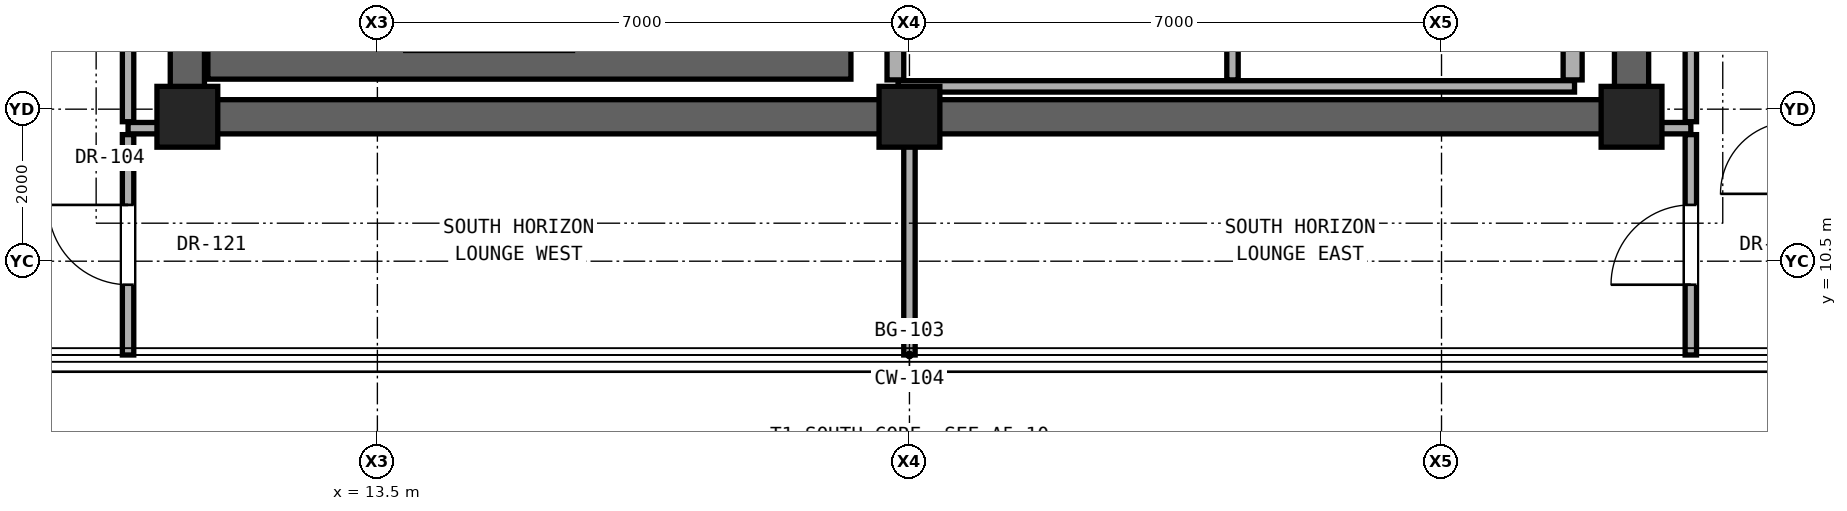
"""IFC4 building model, lengths in metres.
Left out: names, types, materials, properties, quantities, classifications, styles, units other than length and angle.
Written with IfcOpenShell. Run it as: python <this file> out.ifc"""

import sys

from ifc_helpers import new_model, si_unit, direction, frame, frame_2d, origin, origin_2d, place, context, subcontext, project, spatial, rectangle, extrude, element, fill, save


model = new_model("IFC4")
c1 = context("Model", 3, precision=1e-05, world=origin(), true_north=direction((0.0, 1.0)))
c2 = subcontext(c1, "Body", "Model", "MODEL_VIEW")
j1 = project(units=[si_unit("LENGTHUNIT", "METRE"), si_unit("PLANEANGLEUNIT", "RADIAN")], contexts=[c1])
p1 = place(None, origin())
s1 = spatial("IfcSite", under=j1, at=p1, CompositionType="ELEMENT")
p2 = place(p1, origin())
s2 = spatial("IfcBuilding", under=s1, at=p2, CompositionType="ELEMENT")
p3 = place(p2, frame((0.0, 0.0, 229.3)))
s3 = spatial("IfcBuildingStorey", under=s2, at=p3, CompositionType="ELEMENT", Elevation=229.3)
for number, where, z_axis, x_axis in (
    (1, (11.0, 12.4, 0.0), (0.0, 0.0, 1.0), (1.0, 0.0, 0.0)),
    (2, (20.5, 12.4, 0.0), (0.0, 0.0, 1.0), (1.0, 0.0, 0.0)),
    (3, (30.0, 12.4, 0.0), (0.0, 0.0, 1.0), (1.0, 0.0, 0.0)),
):
    element("IfcColumn", number, at=place(p3, frame(where, z_axis=z_axis, x_axis=x_axis)), inside=s3, PredefinedType="COLUMN", context=c2, shape_type="SweptSolid", body=[
        extrude(rectangle(XDim=0.8, YDim=0.8, at=origin_2d()), origin(), (0.0, 0.0, 1.0), 3.3),
    ])
p4 = place(p3, frame((11.0, 12.4, 0.0), z_axis=(0.0, 0.0, 1.0), x_axis=(1.0, 0.0, 0.0)))
e4 = element("IfcWall", 4, at=p4, inside=s3, PredefinedType="SHEAR", context=c2, shape_type="SweptSolid", body=[
    extrude(rectangle(XDim=19.0, YDim=0.45, at=frame_2d((9.5, 0.0))), origin(), (0.0, 0.0, 1.0), 3.1),
])
for number, where, z_axis, x_axis in (
    (5, (11.0, 12.4, 0.0), (0.0, 0.0, 1.0), (0.0, 1.0, 0.0)),
    (6, (30.0, 12.4, 0.0), (0.0, 0.0, 1.0), (0.0, 1.0, 0.0)),
):
    element("IfcWall", number, at=place(p3, frame(where, z_axis=z_axis, x_axis=x_axis)), inside=s3, PredefinedType="SHEAR", context=c2, shape_type="SweptSolid", body=[
        extrude(rectangle(XDim=6.0, YDim=0.45, at=frame_2d((3.0, 0.0))), origin(), (0.0, 0.0, 1.0), 3.1),
    ])
for number, where, z_axis, x_axis in (
    (7, (10.22, 12.25, 0.0), (0.0, 0.0, 1.0), (1.0, 0.0, 0.0)),
    (8, (30.22, 12.25, 0.0), (0.0, 0.0, 1.0), (1.0, 0.0, 0.0)),
):
    element("IfcWall", number, at=place(p3, frame(where, z_axis=z_axis, x_axis=x_axis)), inside=s3, PredefinedType="PARTITIONING", context=c2, shape_type="SweptSolid", body=[
        extrude(rectangle(XDim=0.56, YDim=0.15, at=frame_2d((0.28, 0.0))), origin(), (0.0, 0.0, 1.0), 3.1),
    ])
p5 = place(p3, frame((20.35, 12.8, 0.0), z_axis=(0.0, 0.0, 1.0), x_axis=(1.0, 0.0, 0.0)))
e9 = element("IfcWall", 9, at=p5, inside=s3, PredefinedType="PARTITIONING", context=c2, shape_type="SweptSolid", body=[
    extrude(rectangle(XDim=8.9, YDim=0.15, at=frame_2d((4.45, 0.0))), origin(), (0.0, 0.0, 1.0), 3.1),
])
p6 = place(p3, frame((11.27, 13.12, 0.0), z_axis=(0.0, 0.0, 1.0), x_axis=(1.0, 0.0, 0.0)))
e10 = element("IfcWall", 10, at=p6, inside=s3, PredefinedType="SHEAR", context=c2, shape_type="SweptSolid", body=[
    extrude(rectangle(XDim=8.46, YDim=0.45, at=frame_2d((4.23, 0.0))), origin(), (0.0, 0.0, 1.0), 3.1),
])
p7 = place(p3, frame((10.22, 9.266, 0.0), z_axis=(0.0, 0.0, 1.0), x_axis=(0.0, 1.0, 0.0)))
e11 = element("IfcWall", 11, at=p7, inside=s3, PredefinedType="PARTITIONING", context=c2, shape_type="SweptSolid", body=[
    extrude(rectangle(XDim=2.899, YDim=0.15, at=frame_2d((1.449, 0.0))), origin(), (0.0, 0.0, 1.0), 3.1),
])
p8 = place(p7, frame((0.925, 0.0, 0.0)))
e12 = element("IfcOpeningElement", 12, at=p8, cuts=e11, PredefinedType="OPENING", context=c2, shape_type="SweptSolid", body=[
    extrude(rectangle(XDim=1.05, YDim=2.2, at=frame_2d((0.525, 1.1))), frame((0.0, 0.085, 0.0), z_axis=(0.0, -1.0, 0.0), x_axis=(1.0, 0.0, 0.0)), (0.0, 0.0, 1.0), 0.17),
])
p9 = place(p3, frame((10.22, 12.335, 0.0), z_axis=(0.0, 0.0, 1.0), x_axis=(0.0, 1.0, 0.0)))
e13 = element("IfcWall", 13, at=p9, inside=s3, PredefinedType="PARTITIONING", context=c2, shape_type="SweptSolid", body=[
    extrude(rectangle(XDim=5.98, YDim=0.15, at=frame_2d((2.99, 0.0))), origin(), (0.0, 0.0, 1.0), 2.492),
])
p10 = place(p3, frame((20.315, 12.885, 0.0), z_axis=(0.0, 0.0, 1.0), x_axis=(0.0, 1.0, 0.0)))
e14 = element("IfcWall", 14, at=p10, inside=s3, PredefinedType="SOLIDWALL", context=c2, shape_type="SweptSolid", body=[
    extrude(rectangle(XDim=3.2, YDim=0.22, at=frame_2d((1.6, 0.0))), origin(), (0.0, 0.0, 1.0), 3.1),
])
p11 = place(p3, frame((20.5, 9.266, 0.0), z_axis=(0.0, 0.0, 1.0), x_axis=(0.0, 1.0, 0.0)))
e15 = element("IfcWall", 15, at=p11, inside=s3, PredefinedType="PARTITIONING", context=c2, shape_type="SweptSolid", body=[
    extrude(rectangle(XDim=2.914, YDim=0.15, at=frame_2d((1.457, 0.0))), origin(), (0.0, 0.0, 1.0), 3.1),
])
p12 = place(p3, frame((24.75, 12.885, 0.0), z_axis=(0.0, 0.0, 1.0), x_axis=(0.0, 1.0, 0.0)))
e16 = element("IfcWall", 16, at=p12, inside=s3, PredefinedType="PARTITIONING", context=c2, shape_type="SweptSolid", body=[
    extrude(rectangle(XDim=2.542, YDim=0.15, at=frame_2d((1.271, 0.0))), origin(), (0.0, 0.0, 1.0), 3.1),
])
p13 = place(p12, frame((0.796, 0.0, 0.0)))
e17 = element("IfcOpeningElement", 17, at=p13, cuts=e16, PredefinedType="OPENING", context=c2, shape_type="SweptSolid", body=[
    extrude(rectangle(XDim=0.95, YDim=2.15, at=frame_2d((0.475, 1.075))), frame((0.0, 0.085, 0.0), z_axis=(0.0, -1.0, 0.0), x_axis=(1.0, 0.0, 0.0)), (0.0, 0.0, 1.0), 0.17),
])
p14 = place(p3, frame((29.225, 12.885, 0.0), z_axis=(0.0, 0.0, 1.0), x_axis=(0.0, 1.0, 0.0)))
e18 = element("IfcWall", 18, at=p14, inside=s3, PredefinedType="SOLIDWALL", context=c2, shape_type="SweptSolid", body=[
    extrude(rectangle(XDim=2.542, YDim=0.25, at=frame_2d((1.271, 0.0))), origin(), (0.0, 0.0, 1.0), 3.1),
])
p15 = place(p3, frame((30.78, 9.266, 0.0), z_axis=(0.0, 0.0, 1.0), x_axis=(0.0, 1.0, 0.0)))
e19 = element("IfcWall", 19, at=p15, inside=s3, PredefinedType="PARTITIONING", context=c2, shape_type="SweptSolid", body=[
    extrude(rectangle(XDim=2.899, YDim=0.15, at=frame_2d((1.449, 0.0))), origin(), (0.0, 0.0, 1.0), 3.1),
])
p16 = place(p15, frame((0.925, 0.0, 0.0)))
e20 = element("IfcOpeningElement", 20, at=p16, cuts=e19, PredefinedType="OPENING", context=c2, shape_type="SweptSolid", body=[
    extrude(rectangle(XDim=1.05, YDim=2.2, at=frame_2d((0.525, 1.1))), frame((0.0, 0.085, 0.0), z_axis=(0.0, -1.0, 0.0), x_axis=(1.0, 0.0, 0.0)), (0.0, 0.0, 1.0), 0.17),
])
p17 = place(p3, frame((30.78, 12.335, 0.0), z_axis=(0.0, 0.0, 1.0), x_axis=(0.0, 1.0, 0.0)))
e21 = element("IfcWall", 21, at=p17, inside=s3, PredefinedType="PARTITIONING", context=c2, shape_type="SweptSolid", body=[
    extrude(rectangle(XDim=5.98, YDim=0.15, at=frame_2d((2.99, 0.0))), origin(), (0.0, 0.0, 1.0), 2.492),
])
p18 = place(p8, origin())
e22 = element("IfcDoor", 22, at=p18, inside=s3, OperationType="SINGLE_SWING_RIGHT", PredefinedType="DOOR", context=c2, shape_type="SweptSolid", body=[
    extrude(rectangle(XDim=1.05, YDim=2.2, at=frame_2d((0.525, 1.1))), frame((0.0, 0.025, 0.0), z_axis=(0.0, -1.0, 0.0), x_axis=(1.0, 0.0, 0.0)), (0.0, 0.0, 1.0), 0.05),
])
fill(e12, e22)
p19 = place(p16, origin())
e23 = element("IfcDoor", 23, at=p19, inside=s3, OperationType="SINGLE_SWING_LEFT", PredefinedType="DOOR", context=c2, shape_type="SweptSolid", body=[
    extrude(rectangle(XDim=1.05, YDim=2.2, at=frame_2d((0.525, 1.1))), frame((0.0, 0.025, 0.0), z_axis=(0.0, -1.0, 0.0), x_axis=(1.0, 0.0, 0.0)), (0.0, 0.0, 1.0), 0.05),
])
fill(e20, e23)
save(model, sys.argv[1])
